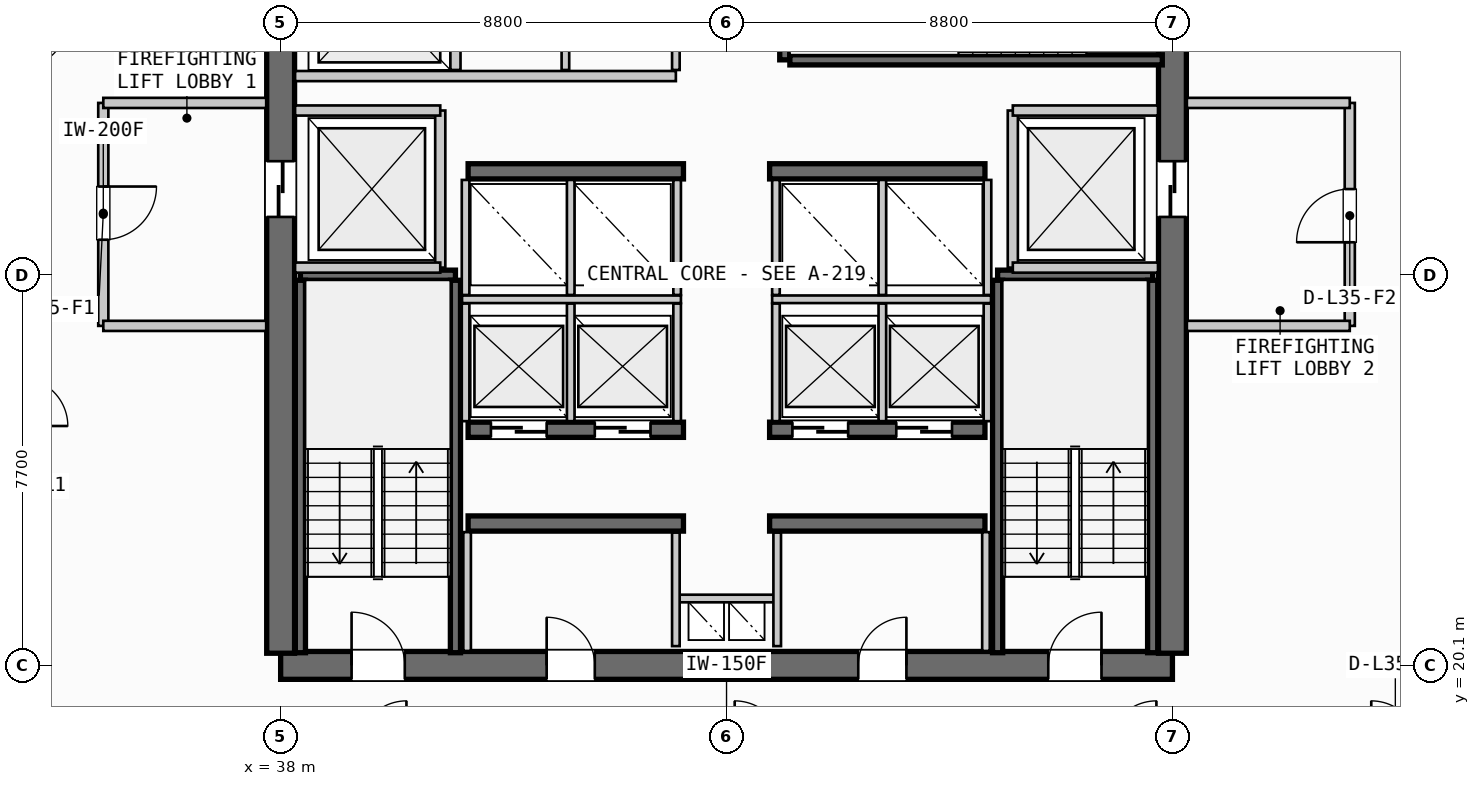
"""IFC4 building model, lengths in metres.
Left out: names, types, materials, properties, quantities, classifications, styles, units other than length and angle.
Written with IfcOpenShell. Run it as: python <this file> out.ifc"""

import sys

from ifc_helpers import new_model, si_unit, direction, frame, frame_2d, origin, place, context, subcontext, project, spatial, rectangle, extrude, source, transform, mapped, element, fill, save


model = new_model("IFC4")
c1 = context("Model", 3, precision=1e-05, world=origin(), true_north=direction((0.0, 1.0)))
c2 = subcontext(c1, "Body", "Model", "MODEL_VIEW")
j1 = project(units=[si_unit("LENGTHUNIT", "METRE"), si_unit("PLANEANGLEUNIT", "RADIAN")], contexts=[c1])
p1 = place(None, origin())
s1 = spatial("IfcSite", under=j1, at=p1, CompositionType="ELEMENT")
p2 = place(p1, origin())
s2 = spatial("IfcBuilding", under=s1, at=p2, CompositionType="ELEMENT")
p3 = place(p2, frame((0.0, 0.0, 139.45)))
s3 = spatial("IfcBuildingStorey", under=s2, at=p3, CompositionType="ELEMENT", Elevation=139.45)
p4 = place(p3, frame((38.0, 20.1, 0.0), z_axis=(0.0, 0.0, 1.0), x_axis=(1.0, 0.0, 0.0)))
e1 = element("IfcWall", 1, at=p4, inside=s3, PredefinedType="SHEAR", context=c2, shape_type="SweptSolid", body=[
    extrude(rectangle(XDim=17.6, YDim=0.55, at=frame_2d((8.8, 0.0))), origin(), (0.0, 0.0, 1.0), 3.3),
])
p5 = place(p4, frame((1.4, 0.0, 0.0)))
e2 = element("IfcOpeningElement", 2, at=p5, cuts=e1, PredefinedType="OPENING", context=c2, shape_type="SweptSolid", body=[
    extrude(rectangle(XDim=1.05, YDim=2.15, at=frame_2d((0.525, 1.075))), frame((0.0, 0.285, 0.0), z_axis=(0.0, -1.0, 0.0), x_axis=(1.0, 0.0, 0.0)), (0.0, 0.0, 1.0), 0.57),
])
p6 = place(p4, frame((15.15, 0.0, 0.0)))
e3 = element("IfcOpeningElement", 3, at=p6, cuts=e1, PredefinedType="OPENING", context=c2, shape_type="SweptSolid", body=[
    extrude(rectangle(XDim=1.05, YDim=2.15, at=frame_2d((0.525, 1.075))), frame((0.0, 0.285, 0.0), z_axis=(0.0, -1.0, 0.0), x_axis=(1.0, 0.0, 0.0)), (0.0, 0.0, 1.0), 0.57),
])
p7 = place(p4, frame((5.25, 0.0, 0.0)))
e4 = element("IfcOpeningElement", 4, at=p7, cuts=e1, PredefinedType="OPENING", context=c2, shape_type="SweptSolid", body=[
    extrude(rectangle(XDim=0.95, YDim=2.15, at=frame_2d((0.475, 1.075))), frame((0.0, 0.285, 0.0), z_axis=(0.0, -1.0, 0.0), x_axis=(1.0, 0.0, 0.0)), (0.0, 0.0, 1.0), 0.57),
])
p8 = place(p4, frame((11.4, 0.0, 0.0)))
e5 = element("IfcOpeningElement", 5, at=p8, cuts=e1, PredefinedType="OPENING", context=c2, shape_type="SweptSolid", body=[
    extrude(rectangle(XDim=0.95, YDim=2.15, at=frame_2d((0.475, 1.075))), frame((0.0, 0.285, 0.0), z_axis=(0.0, -1.0, 0.0), x_axis=(1.0, 0.0, 0.0)), (0.0, 0.0, 1.0), 0.57),
])
p9 = place(p3, frame((38.0, 35.26, 0.0), z_axis=(0.0, 0.0, 1.0), x_axis=(0.0, -1.0, 0.0)))
e6 = element("IfcWall", 6, at=p9, inside=s3, PredefinedType="SHEAR", context=c2, shape_type="SweptSolid", body=[
    extrude(rectangle(XDim=14.92, YDim=0.55, at=frame_2d((7.46, 0.0))), origin(), (0.0, 0.0, 1.0), 3.3),
])
p10 = place(p9, frame((5.21, 0.0, 0.0)))
e7 = element("IfcOpeningElement", 7, at=p10, cuts=e6, PredefinedType="OPENING", context=c2, shape_type="SweptSolid", body=[
    extrude(rectangle(XDim=1.1, YDim=2.2, at=frame_2d((0.55, 1.1))), frame((0.0, 0.285, 0.0), z_axis=(0.0, -1.0, 0.0), x_axis=(1.0, 0.0, 0.0)), (0.0, 0.0, 1.0), 0.57),
])
p11 = place(p3, frame((55.6, 20.34, 0.0), z_axis=(0.0, 0.0, 1.0), x_axis=(0.0, 1.0, 0.0)))
e8 = element("IfcWall", 8, at=p11, inside=s3, PredefinedType="SHEAR", context=c2, shape_type="SweptSolid", body=[
    extrude(rectangle(XDim=14.92, YDim=0.55, at=frame_2d((7.46, 0.0))), origin(), (0.0, 0.0, 1.0), 3.3),
])
p12 = place(p11, frame((12.71, 0.0, 0.0)))
e9 = element("IfcOpeningElement", 9, at=p12, cuts=e8, PredefinedType="OPENING", context=c2, shape_type="SweptSolid", body=[
    extrude(rectangle(XDim=1.05, YDim=2.15, at=frame_2d((0.525, 1.075))), frame((0.0, 0.285, 0.0), z_axis=(0.0, -1.0, 0.0), x_axis=(1.0, 0.0, 0.0)), (0.0, 0.0, 1.0), 0.57),
])
p13 = place(p11, frame((8.61, 0.0, 0.0)))
e10 = element("IfcOpeningElement", 10, at=p13, cuts=e8, PredefinedType="OPENING", context=c2, shape_type="SweptSolid", body=[
    extrude(rectangle(XDim=1.1, YDim=2.2, at=frame_2d((0.55, 1.1))), frame((0.0, 0.285, 0.0), z_axis=(0.0, -1.0, 0.0), x_axis=(1.0, 0.0, 0.0)), (0.0, 0.0, 1.0), 0.57),
])
for number, where, z_axis, x_axis in (
    (11, (41.7, 22.9, 0.0), (0.0, 0.0, 1.0), (1.0, 0.0, 0.0)),
    (12, (47.65, 22.9, 0.0), (0.0, 0.0, 1.0), (1.0, 0.0, 0.0)),
):
    element("IfcWall", number, at=place(p3, frame(where, z_axis=z_axis, x_axis=x_axis)), inside=s3, PredefinedType="SHEAR", context=c2, shape_type="SweptSolid", body=[
        extrude(rectangle(XDim=4.25, YDim=0.3, at=frame_2d((2.125, 0.0))), origin(), (0.0, 0.0, 1.0), 3.3),
    ])
p14 = place(p3, frame((41.7, 24.75, 0.0), z_axis=(0.0, 0.0, 1.0), x_axis=(1.0, 0.0, 0.0)))
e13 = element("IfcWall", 13, at=p14, inside=s3, PredefinedType="SHEAR", context=c2, shape_type="SweptSolid", body=[
    extrude(rectangle(XDim=4.25, YDim=0.3, at=frame_2d((2.125, 0.0))), origin(), (0.0, 0.0, 1.0), 3.3),
])
p15 = place(p14, frame((0.45, 0.0, 0.0)))
e14 = element("IfcOpeningElement", 14, at=p15, cuts=e13, PredefinedType="OPENING", context=c2, shape_type="SweptSolid", body=[
    extrude(rectangle(XDim=1.1, YDim=2.2, at=frame_2d((0.55, 1.1))), frame((0.0, 0.16, 0.0), z_axis=(0.0, -1.0, 0.0), x_axis=(1.0, 0.0, 0.0)), (0.0, 0.0, 1.0), 0.32),
])
p16 = place(p14, frame((2.5, 0.0, 0.0)))
e15 = element("IfcOpeningElement", 15, at=p16, cuts=e13, PredefinedType="OPENING", context=c2, shape_type="SweptSolid", body=[
    extrude(rectangle(XDim=1.1, YDim=2.2, at=frame_2d((0.55, 1.1))), frame((0.0, 0.16, 0.0), z_axis=(0.0, -1.0, 0.0), x_axis=(1.0, 0.0, 0.0)), (0.0, 0.0, 1.0), 0.32),
])
p17 = place(p3, frame((47.65, 24.75, 0.0), z_axis=(0.0, 0.0, 1.0), x_axis=(1.0, 0.0, 0.0)))
e16 = element("IfcWall", 16, at=p17, inside=s3, PredefinedType="SHEAR", context=c2, shape_type="SweptSolid", body=[
    extrude(rectangle(XDim=4.25, YDim=0.3, at=frame_2d((2.125, 0.0))), origin(), (0.0, 0.0, 1.0), 3.3),
])
p18 = place(p17, frame((0.45, 0.0, 0.0)))
e17 = element("IfcOpeningElement", 17, at=p18, cuts=e16, PredefinedType="OPENING", context=c2, shape_type="SweptSolid", body=[
    extrude(rectangle(XDim=1.1, YDim=2.2, at=frame_2d((0.55, 1.1))), frame((0.0, 0.16, 0.0), z_axis=(0.0, -1.0, 0.0), x_axis=(1.0, 0.0, 0.0)), (0.0, 0.0, 1.0), 0.32),
])
p19 = place(p17, frame((2.5, 0.0, 0.0)))
e18 = element("IfcOpeningElement", 18, at=p19, cuts=e16, PredefinedType="OPENING", context=c2, shape_type="SweptSolid", body=[
    extrude(rectangle(XDim=1.1, YDim=2.2, at=frame_2d((0.55, 1.1))), frame((0.0, 0.16, 0.0), z_axis=(0.0, -1.0, 0.0), x_axis=(1.0, 0.0, 0.0)), (0.0, 0.0, 1.0), 0.32),
])
for number, where, z_axis, x_axis in (
    (19, (41.7, 29.85, 0.0), (0.0, 0.0, 1.0), (1.0, 0.0, 0.0)),
    (20, (47.65, 29.85, 0.0), (0.0, 0.0, 1.0), (1.0, 0.0, 0.0)),
):
    element("IfcWall", number, at=place(p3, frame(where, z_axis=z_axis, x_axis=x_axis)), inside=s3, PredefinedType="SHEAR", context=c2, shape_type="SweptSolid", body=[
        extrude(rectangle(XDim=4.25, YDim=0.3, at=frame_2d((2.125, 0.0))), origin(), (0.0, 0.0, 1.0), 3.3),
    ])
p20 = place(p3, frame((38.39, 27.8, 0.0), z_axis=(0.0, 0.0, 1.0), x_axis=(1.0, 0.0, 0.0)))
e21 = element("IfcWall", 21, at=p20, inside=s3, PredefinedType="SHEAR", context=c2, shape_type="SweptSolid", body=[
    extrude(rectangle(XDim=3.06, YDim=0.2, at=frame_2d((1.53, 0.0))), origin(), (0.0, 0.0, 1.0), 3.3),
])
for number, where, z_axis, x_axis in (
    (22, (41.45, 27.7, 0.0), (0.0, 0.0, 1.0), (0.0, -1.0, 0.0)),
    (23, (38.39, 20.35, 0.0), (0.0, 0.0, 1.0), (0.0, 1.0, 0.0)),
):
    element("IfcWall", number, at=place(p3, frame(where, z_axis=z_axis, x_axis=x_axis)), inside=s3, PredefinedType="SHEAR", context=c2, shape_type="SweptSolid", body=[
        extrude(rectangle(XDim=7.35, YDim=0.2, at=frame_2d((3.675, 0.0))), origin(), (0.0, 0.0, 1.0), 3.3),
    ])
p21 = place(p3, frame((52.15, 27.8, 0.0), z_axis=(0.0, 0.0, 1.0), x_axis=(1.0, 0.0, 0.0)))
e24 = element("IfcWall", 24, at=p21, inside=s3, PredefinedType="SHEAR", context=c2, shape_type="SweptSolid", body=[
    extrude(rectangle(XDim=3.06, YDim=0.2, at=frame_2d((1.53, 0.0))), origin(), (0.0, 0.0, 1.0), 3.3),
])
for number, where, z_axis, x_axis in (
    (25, (55.21, 27.7, 0.0), (0.0, 0.0, 1.0), (0.0, -1.0, 0.0)),
    (26, (52.15, 20.35, 0.0), (0.0, 0.0, 1.0), (0.0, 1.0, 0.0)),
):
    element("IfcWall", number, at=place(p3, frame(where, z_axis=z_axis, x_axis=x_axis)), inside=s3, PredefinedType="SHEAR", context=c2, shape_type="SweptSolid", body=[
        extrude(rectangle(XDim=7.35, YDim=0.2, at=frame_2d((3.675, 0.0))), origin(), (0.0, 0.0, 1.0), 3.3),
    ])
p22 = place(p3, frame((47.95, 32.05, 0.0), z_axis=(0.0, 0.0, 1.0), x_axis=(0.0, 1.0, 0.0)))
e27 = element("IfcWall", 27, at=p22, inside=s3, PredefinedType="SHEAR", context=c2, shape_type="SweptSolid", body=[
    extrude(rectangle(XDim=3.06, YDim=0.2, at=frame_2d((1.53, 0.0))), origin(), (0.0, 0.0, 1.0), 3.3),
])
p23 = place(p3, frame((55.4, 32.05, 0.0), z_axis=(0.0, 0.0, 1.0), x_axis=(-1.0, 0.0, 0.0)))
e28 = element("IfcWall", 28, at=p23, inside=s3, PredefinedType="SHEAR", context=c2, shape_type="SweptSolid", body=[
    extrude(rectangle(XDim=7.35, YDim=0.2, at=frame_2d((3.675, 0.0))), origin(), (0.0, 0.0, 1.0), 3.3),
])
p24 = place(p3, frame((45.8, 21.42, 0.0), z_axis=(0.0, 0.0, 1.0), x_axis=(1.0, 0.0, 0.0)))
e29 = element("IfcWall", 29, at=p24, inside=s3, PredefinedType="PARTITIONING", context=c2, shape_type="SweptSolid", body=[
    extrude(rectangle(XDim=2.0, YDim=0.15, at=frame_2d((1.0, 0.0))), origin(), (0.0, 0.0, 1.0), 2.305),
])
for number, where, z_axis, x_axis in (
    (30, (45.8, 20.48, 0.0), (0.0, 0.0, 1.0), (0.0, 1.0, 0.0)),
    (31, (47.8, 20.48, 0.0), (0.0, 0.0, 1.0), (0.0, 1.0, 0.0)),
):
    element("IfcWall", number, at=place(p3, frame(where, z_axis=z_axis, x_axis=x_axis)), inside=s3, PredefinedType="PARTITIONING", context=c2, shape_type="SweptSolid", body=[
        extrude(rectangle(XDim=2.24, YDim=0.15, at=frame_2d((1.12, 0.0))), origin(), (0.0, 0.0, 1.0), 2.305),
    ])
p25 = place(p3, frame((41.15, 27.95, 0.0), z_axis=(0.0, 0.0, 1.0), x_axis=(0.0, 1.0, 0.0)))
e32 = element("IfcWall", 32, at=p25, inside=s3, PredefinedType="PARTITIONING", context=c2, shape_type="SweptSolid", body=[
    extrude(rectangle(XDim=3.1, YDim=0.2, at=frame_2d((1.55, 0.0))), origin(), (0.0, 0.0, 1.0), 2.305),
])
for number, where, z_axis, x_axis in (
    (33, (38.285, 27.95, 0.0), (0.0, 0.0, 1.0), (1.0, 0.0, 0.0)),
    (34, (38.285, 31.05, 0.0), (0.0, 0.0, 1.0), (1.0, 0.0, 0.0)),
):
    element("IfcWall", number, at=place(p3, frame(where, z_axis=z_axis, x_axis=x_axis)), inside=s3, PredefinedType="PARTITIONING", context=c2, shape_type="SweptSolid", body=[
        extrude(rectangle(XDim=2.865, YDim=0.2, at=frame_2d((1.433, 0.0))), origin(), (0.0, 0.0, 1.0), 2.305),
    ])
p26 = place(p3, frame((34.5, 31.2, 0.0), z_axis=(0.0, 0.0, 1.0), x_axis=(0.0, -1.0, 0.0)))
e35 = element("IfcWall", 35, at=p26, inside=s3, PredefinedType="PARTITIONING", context=c2, shape_type="SweptSolid", body=[
    extrude(rectangle(XDim=4.4, YDim=0.2, at=frame_2d((2.2, 0.0))), origin(), (0.0, 0.0, 1.0), 2.305),
])
p27 = place(p26, frame((1.65, 0.0, 0.0)))
e36 = element("IfcOpeningElement", 36, at=p27, cuts=e35, PredefinedType="OPENING", context=c2, shape_type="SweptSolid", body=[
    extrude(rectangle(XDim=1.05, YDim=2.15, at=frame_2d((0.525, 1.075))), frame((0.0, 0.11, 0.0), z_axis=(0.0, -1.0, 0.0), x_axis=(1.0, 0.0, 0.0)), (0.0, 0.0, 1.0), 0.22),
])
for number, where, z_axis, x_axis in (
    (37, (34.5, 26.8, 0.0), (0.0, 0.0, 1.0), (1.0, 0.0, 0.0)),
    (38, (34.5, 31.2, 0.0), (0.0, 0.0, 1.0), (1.0, 0.0, 0.0)),
):
    element("IfcWall", number, at=place(p3, frame(where, z_axis=z_axis, x_axis=x_axis)), inside=s3, PredefinedType="PARTITIONING", context=c2, shape_type="SweptSolid", body=[
        extrude(rectangle(XDim=3.215, YDim=0.2, at=frame_2d((1.607, 0.0))), origin(), (0.0, 0.0, 1.0), 2.305),
    ])
p28 = place(p3, frame((52.45, 27.95, 0.0), z_axis=(0.0, 0.0, 1.0), x_axis=(0.0, 1.0, 0.0)))
e39 = element("IfcWall", 39, at=p28, inside=s3, PredefinedType="PARTITIONING", context=c2, shape_type="SweptSolid", body=[
    extrude(rectangle(XDim=3.1, YDim=0.2, at=frame_2d((1.55, 0.0))), origin(), (0.0, 0.0, 1.0), 2.305),
])
for number, where, z_axis, x_axis in (
    (40, (52.45, 27.95, 0.0), (0.0, 0.0, 1.0), (1.0, 0.0, 0.0)),
    (41, (52.45, 31.05, 0.0), (0.0, 0.0, 1.0), (1.0, 0.0, 0.0)),
):
    element("IfcWall", number, at=place(p3, frame(where, z_axis=z_axis, x_axis=x_axis)), inside=s3, PredefinedType="PARTITIONING", context=c2, shape_type="SweptSolid", body=[
        extrude(rectangle(XDim=2.865, YDim=0.2, at=frame_2d((1.433, 0.0))), origin(), (0.0, 0.0, 1.0), 2.305),
    ])
p29 = place(p3, frame((59.1, 26.8, 0.0), z_axis=(0.0, 0.0, 1.0), x_axis=(0.0, 1.0, 0.0)))
e42 = element("IfcWall", 42, at=p29, inside=s3, PredefinedType="PARTITIONING", context=c2, shape_type="SweptSolid", body=[
    extrude(rectangle(XDim=4.4, YDim=0.2, at=frame_2d((2.2, 0.0))), origin(), (0.0, 0.0, 1.0), 2.305),
])
p30 = place(p29, frame((1.65, 0.0, 0.0)))
e43 = element("IfcOpeningElement", 43, at=p30, cuts=e42, PredefinedType="OPENING", context=c2, shape_type="SweptSolid", body=[
    extrude(rectangle(XDim=1.05, YDim=2.15, at=frame_2d((0.525, 1.075))), frame((0.0, 0.11, 0.0), z_axis=(0.0, -1.0, 0.0), x_axis=(1.0, 0.0, 0.0)), (0.0, 0.0, 1.0), 0.22),
])
for number, where, z_axis, x_axis in (
    (44, (55.885, 26.8, 0.0), (0.0, 0.0, 1.0), (1.0, 0.0, 0.0)),
    (45, (55.885, 31.2, 0.0), (0.0, 0.0, 1.0), (1.0, 0.0, 0.0)),
):
    element("IfcWall", number, at=place(p3, frame(where, z_axis=z_axis, x_axis=x_axis)), inside=s3, PredefinedType="PARTITIONING", context=c2, shape_type="SweptSolid", body=[
        extrude(rectangle(XDim=3.215, YDim=0.2, at=frame_2d((1.607, 0.0))), origin(), (0.0, 0.0, 1.0), 2.305),
    ])
for number, where, z_axis, x_axis in (
    (46, (41.68, 20.385, 0.0), (0.0, 0.0, 1.0), (0.0, 1.0, 0.0)),
    (47, (51.92, 20.385, 0.0), (0.0, 0.0, 1.0), (0.0, 1.0, 0.0)),
):
    element("IfcWall", number, at=place(p3, frame(where, z_axis=z_axis, x_axis=x_axis)), inside=s3, PredefinedType="PARTITIONING", context=c2, shape_type="SweptSolid", body=[
        extrude(rectangle(XDim=2.345, YDim=0.15, at=frame_2d((1.172, 0.0))), origin(), (0.0, 0.0, 1.0), 2.305),
    ])
p31 = place(p3, frame((41.58, 27.325, 0.0), z_axis=(0.0, 0.0, 1.0), x_axis=(1.0, 0.0, 0.0)))
e48 = element("IfcWall", 48, at=p31, inside=s3, PredefinedType="PARTITIONING", context=c2, shape_type="SweptSolid", body=[
    extrude(rectangle(XDim=4.32, YDim=0.15, at=frame_2d((2.16, 0.0))), origin(), (0.0, 0.0, 1.0), 2.305),
])
p32 = place(p3, frame((47.7, 27.325, 0.0), z_axis=(0.0, 0.0, 1.0), x_axis=(1.0, 0.0, 0.0)))
e49 = element("IfcWall", 49, at=p32, inside=s3, PredefinedType="PARTITIONING", context=c2, shape_type="SweptSolid", body=[
    extrude(rectangle(XDim=4.32, YDim=0.15, at=frame_2d((2.16, 0.0))), origin(), (0.0, 0.0, 1.0), 2.305),
])
for number, where, z_axis, x_axis in (
    (50, (41.65, 24.92, 0.0), (0.0, 0.0, 1.0), (0.0, 1.0, 0.0)),
    (51, (43.725, 24.92, 0.0), (0.0, 0.0, 1.0), (0.0, 1.0, 0.0)),
    (52, (45.825, 24.92, 0.0), (0.0, 0.0, 1.0), (0.0, 1.0, 0.0)),
    (53, (47.775, 24.92, 0.0), (0.0, 0.0, 1.0), (0.0, 1.0, 0.0)),
    (54, (49.875, 24.92, 0.0), (0.0, 0.0, 1.0), (0.0, 1.0, 0.0)),
    (55, (51.95, 24.92, 0.0), (0.0, 0.0, 1.0), (0.0, 1.0, 0.0)),
):
    element("IfcWall", number, at=place(p3, frame(where, z_axis=z_axis, x_axis=x_axis)), inside=s3, PredefinedType="PARTITIONING", context=c2, shape_type="SweptSolid", body=[
        extrude(rectangle(XDim=2.32, YDim=0.15, at=frame_2d((1.16, 0.0))), origin(), (0.0, 0.0, 1.0), 2.305),
    ])
for number, where, z_axis, x_axis in (
    (56, (41.65, 27.41, 0.0), (0.0, 0.0, 1.0), (0.0, 1.0, 0.0)),
    (57, (43.725, 27.41, 0.0), (0.0, 0.0, 1.0), (0.0, 1.0, 0.0)),
    (58, (45.825, 27.41, 0.0), (0.0, 0.0, 1.0), (0.0, 1.0, 0.0)),
    (59, (47.775, 27.41, 0.0), (0.0, 0.0, 1.0), (0.0, 1.0, 0.0)),
    (60, (49.875, 27.41, 0.0), (0.0, 0.0, 1.0), (0.0, 1.0, 0.0)),
    (61, (51.95, 27.41, 0.0), (0.0, 0.0, 1.0), (0.0, 1.0, 0.0)),
):
    element("IfcWall", number, at=place(p3, frame(where, z_axis=z_axis, x_axis=x_axis)), inside=s3, PredefinedType="PARTITIONING", context=c2, shape_type="SweptSolid", body=[
        extrude(rectangle(XDim=2.27, YDim=0.15, at=frame_2d((1.135, 0.0))), origin(), (0.0, 0.0, 1.0), 2.305),
    ])
p33 = place(p3, frame((41.45, 31.85, 0.0), z_axis=(0.0, 0.0, 1.0), x_axis=(0.0, 1.0, 0.0)))
e62 = element("IfcWall", 62, at=p33, inside=s3, PredefinedType="PARTITIONING", context=c2, shape_type="SweptSolid", body=[
    extrude(rectangle(XDim=3.365, YDim=0.2, at=frame_2d((1.683, 0.0))), origin(), (0.0, 0.0, 1.0), 2.305),
])
p34 = place(p3, frame((38.285, 31.73, 0.0), z_axis=(0.0, 0.0, 1.0), x_axis=(1.0, 0.0, 0.0)))
e63 = element("IfcWall", 63, at=p34, inside=s3, PredefinedType="PARTITIONING", context=c2, shape_type="SweptSolid", body=[
    extrude(rectangle(XDim=7.515, YDim=0.2, at=frame_2d((3.758, 0.0))), origin(), (0.0, 0.0, 1.0), 2.305),
])
p35 = place(p3, frame((45.8, 31.85, 0.0), z_axis=(0.0, 0.0, 1.0), x_axis=(0.0, 1.0, 0.0)))
e64 = element("IfcWall", 64, at=p35, inside=s3, PredefinedType="PARTITIONING", context=c2, shape_type="SweptSolid", body=[
    extrude(rectangle(XDim=3.365, YDim=0.15, at=frame_2d((1.683, 0.0))), origin(), (0.0, 0.0, 1.0), 2.305),
])
p36 = place(p3, frame((43.62, 31.85, 0.0), z_axis=(0.0, 0.0, 1.0), x_axis=(0.0, 1.0, 0.0)))
e65 = element("IfcWall", 65, at=p36, inside=s3, PredefinedType="PLUMBINGWALL", context=c2, shape_type="SweptSolid", body=[
    extrude(rectangle(XDim=3.365, YDim=0.15, at=frame_2d((1.683, 0.0))), origin(), (0.0, 0.0, 1.0), 2.305),
])
m1 = source(origin(), c2, "Body", "SweptSolid", [
    extrude(rectangle(XDim=1.05, YDim=2.15, at=frame_2d((0.525, 1.075))), frame((0.0, 0.025, 0.0), z_axis=(0.0, -1.0, 0.0), x_axis=(1.0, 0.0, 0.0)), (0.0, 0.0, 1.0), 0.05),
])
p37 = place(p5, origin())
e66 = element("IfcDoor", 66, at=p37, inside=s3, OperationType="SINGLE_SWING_LEFT", PredefinedType="DOOR", context=c2, shape_type="MappedRepresentation", body=[
    mapped(m1, transform((0.0, 0.0, 0.0), scale=1.0)),
])
fill(e2, e66)
p38 = place(p6, origin())
e67 = element("IfcDoor", 67, at=p38, inside=s3, OperationType="SINGLE_SWING_RIGHT", PredefinedType="DOOR", context=c2, shape_type="MappedRepresentation", body=[
    mapped(m1, transform((0.0, 0.0, 0.0), scale=1.0)),
])
fill(e3, e67)
m2 = source(origin(), c2, "Body", "SweptSolid", [
    extrude(rectangle(XDim=1.1, YDim=2.2, at=frame_2d((0.55, 1.1))), frame((0.0, 0.025, 0.0), z_axis=(0.0, -1.0, 0.0), x_axis=(1.0, 0.0, 0.0)), (0.0, 0.0, 1.0), 0.05),
])
p39 = place(p10, origin())
e68 = element("IfcDoor", 68, at=p39, inside=s3, OperationType="SLIDING_TO_LEFT", PredefinedType="DOOR", context=c2, shape_type="MappedRepresentation", body=[
    mapped(m2, transform((0.0, 0.0, 0.0), scale=1.0)),
])
fill(e7, e68)
p40 = place(p13, origin())
e69 = element("IfcDoor", 69, at=p40, inside=s3, OperationType="SLIDING_TO_RIGHT", PredefinedType="DOOR", context=c2, shape_type="MappedRepresentation", body=[
    mapped(m2, transform((0.0, 0.0, 0.0), scale=1.0)),
])
fill(e10, e69)
m3 = source(origin(), c2, "Body", "SweptSolid", [
    extrude(rectangle(XDim=0.95, YDim=2.15, at=frame_2d((0.475, 1.075))), frame((0.0, 0.025, 0.0), z_axis=(0.0, -1.0, 0.0), x_axis=(1.0, 0.0, 0.0)), (0.0, 0.0, 1.0), 0.05),
])
p41 = place(p7, origin())
e70 = element("IfcDoor", 70, at=p41, inside=s3, OperationType="SINGLE_SWING_LEFT", PredefinedType="DOOR", context=c2, shape_type="MappedRepresentation", body=[
    mapped(m3, transform((0.0, 0.0, 0.0), scale=1.0)),
])
fill(e4, e70)
p42 = place(p8, origin())
e71 = element("IfcDoor", 71, at=p42, inside=s3, OperationType="SINGLE_SWING_RIGHT", PredefinedType="DOOR", context=c2, shape_type="MappedRepresentation", body=[
    mapped(m3, transform((0.0, 0.0, 0.0), scale=1.0)),
])
fill(e5, e71)
p43 = place(p15, origin())
e72 = element("IfcDoor", 72, at=p43, inside=s3, OperationType="SLIDING_TO_RIGHT", PredefinedType="DOOR", context=c2, shape_type="MappedRepresentation", body=[
    mapped(m2, transform((0.0, 0.0, 0.0), scale=1.0)),
])
fill(e14, e72)
p44 = place(p16, origin())
e73 = element("IfcDoor", 73, at=p44, inside=s3, OperationType="SLIDING_TO_RIGHT", PredefinedType="DOOR", context=c2, shape_type="MappedRepresentation", body=[
    mapped(m2, transform((0.0, 0.0, 0.0), scale=1.0)),
])
fill(e15, e73)
p45 = place(p18, origin())
e74 = element("IfcDoor", 74, at=p45, inside=s3, OperationType="SLIDING_TO_RIGHT", PredefinedType="DOOR", context=c2, shape_type="MappedRepresentation", body=[
    mapped(m2, transform((0.0, 0.0, 0.0), scale=1.0)),
])
fill(e17, e74)
p46 = place(p19, origin())
e75 = element("IfcDoor", 75, at=p46, inside=s3, OperationType="SLIDING_TO_RIGHT", PredefinedType="DOOR", context=c2, shape_type="MappedRepresentation", body=[
    mapped(m2, transform((0.0, 0.0, 0.0), scale=1.0)),
])
fill(e18, e75)
p47 = place(p27, origin())
e76 = element("IfcDoor", 76, at=p47, inside=s3, OperationType="SINGLE_SWING_LEFT", PredefinedType="DOOR", context=c2, shape_type="MappedRepresentation", body=[
    mapped(m1, transform((0.0, 0.0, 0.0), scale=1.0)),
])
fill(e36, e76)
p48 = place(p30, origin())
e77 = element("IfcDoor", 77, at=p48, inside=s3, OperationType="SINGLE_SWING_LEFT", PredefinedType="DOOR", context=c2, shape_type="MappedRepresentation", body=[
    mapped(m1, transform((0.0, 0.0, 0.0), scale=1.0)),
])
fill(e43, e77)
save(model, sys.argv[1])
